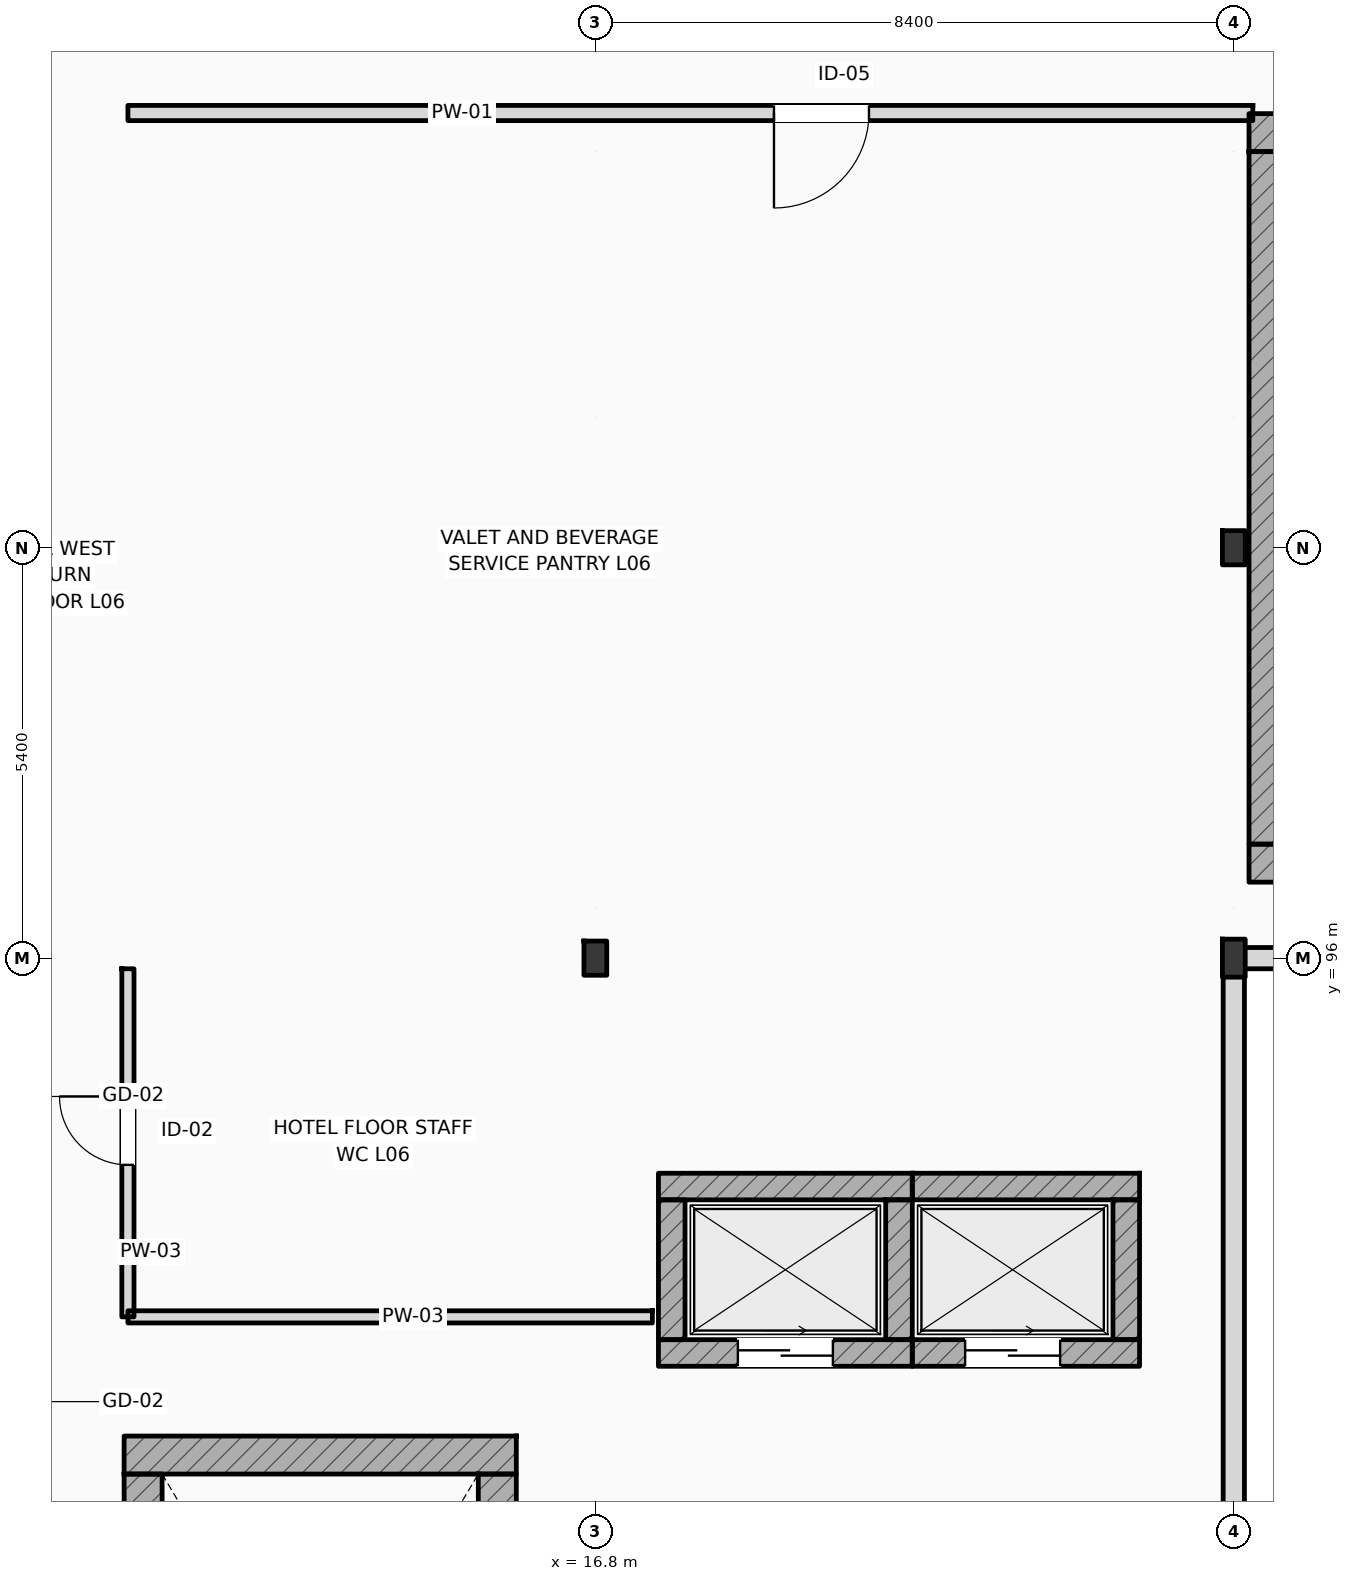
"""IFC4 building model, lengths in metres.
Left out: names, types, materials, properties, quantities, classifications, styles, units other than length and angle.
Written with IfcOpenShell. Run it as: python <this file> out.ifc"""

import sys

from ifc_helpers import new_model, si_unit, direction, frame, frame_2d, origin, origin_2d, place, context, subcontext, project, spatial, rectangle, i_section, extrude, element, fill, save


model = new_model("IFC4")
c1 = context("Model", 3, precision=1e-05, world=origin(), true_north=direction((0.0, 1.0)))
c2 = subcontext(c1, "Body", "Model", "MODEL_VIEW")
j1 = project(units=[si_unit("LENGTHUNIT", "METRE"), si_unit("PLANEANGLEUNIT", "RADIAN")], contexts=[c1])
p1 = place(None, origin())
s1 = spatial("IfcSite", under=j1, at=p1, CompositionType="ELEMENT")
p2 = place(p1, origin())
s2 = spatial("IfcBuilding", under=s1, at=p2, CompositionType="ELEMENT")
p3 = place(p2, frame((0.0, 0.0, 28.2)))
s3 = spatial("IfcBuildingStorey", under=s2, at=p3, CompositionType="ELEMENT", Elevation=28.2)
p4 = place(p3, frame((16.8, 96.0, 0.0), z_axis=(0.0, 0.0, 1.0), x_axis=(1.0, 0.0, 0.0)))
e1 = element("IfcColumn", 1, at=p4, inside=s3, PredefinedType="COLUMN", context=c2, shape_type="SweptSolid", body=[
    extrude(i_section(OverallWidth=0.3, OverallDepth=0.45, WebThickness=0.014, FlangeThickness=0.026, FilletRadius=0.027, at=origin_2d()), origin(), (0.0, 0.0, 1.0), 3.6),
])
p5 = place(p3, frame((25.2, 96.0, 0.0), z_axis=(0.0, 0.0, 1.0), x_axis=(1.0, 0.0, 0.0)))
e2 = element("IfcColumn", 2, at=p5, inside=s3, PredefinedType="COLUMN", context=c2, shape_type="SweptSolid", body=[
    extrude(i_section(OverallWidth=0.3, OverallDepth=0.5, WebThickness=0.014, FlangeThickness=0.028, FilletRadius=0.027, at=origin_2d()), origin(), (0.0, 0.0, 1.0), 3.6),
])
for number, where, z_axis, x_axis in (
    (3, (16.8, 101.4, 0.0), (0.0, 0.0, 1.0), (1.0, 0.0, 0.0)),
    (4, (25.2, 101.4, 0.0), (0.0, 0.0, 1.0), (1.0, 0.0, 0.0)),
):
    element("IfcColumn", number, at=place(p3, frame(where, z_axis=z_axis, x_axis=x_axis)), inside=s3, PredefinedType="COLUMN", context=c2, shape_type="SweptSolid", body=[
        extrude(i_section(OverallWidth=0.3, OverallDepth=0.45, WebThickness=0.014, FlangeThickness=0.026, FilletRadius=0.027, at=origin_2d()), origin(), (0.0, 0.0, 1.0), 3.6),
    ])
p6 = place(p3, frame((10.6, 89.462, 0.0), z_axis=(0.0, 0.0, 1.0), x_axis=(1.0, 0.0, 0.0)))
e5 = element("IfcWall", 5, at=p6, inside=s3, PredefinedType="SHEAR", context=c2, shape_type="SweptSolid", body=[
    extrude(rectangle(XDim=5.16, YDim=0.5, at=frame_2d((2.58, 0.0))), origin(), (0.0, 0.0, 1.0), 3.6),
])
p7 = place(p3, frame((10.85, 80.1, 0.0), z_axis=(0.0, 0.0, 1.0), x_axis=(0.0, 1.0, 0.0)))
e6 = element("IfcWall", 6, at=p7, inside=s3, PredefinedType="SHEAR", context=c2, shape_type="SweptSolid", body=[
    extrude(rectangle(XDim=9.112, YDim=0.5, at=frame_2d((4.556, 0.0))), origin(), (0.0, 0.0, 1.0), 3.6),
])
p8 = place(p3, frame((15.51, 80.1, 0.0), z_axis=(0.0, 0.0, 1.0), x_axis=(0.0, 1.0, 0.0)))
e7 = element("IfcWall", 7, at=p8, inside=s3, PredefinedType="SHEAR", context=c2, shape_type="SweptSolid", body=[
    extrude(rectangle(XDim=9.112, YDim=0.5, at=frame_2d((4.556, 0.0))), origin(), (0.0, 0.0, 1.0), 3.6),
])
p9 = place(p8, frame((0.44, 0.0, 0.0)))
e8 = element("IfcOpeningElement", 8, at=p9, cuts=e7, PredefinedType="OPENING", context=c2, shape_type="SweptSolid", body=[
    extrude(rectangle(XDim=1.1, YDim=2.2, at=frame_2d((0.55, 1.1))), frame((0.0, 0.26, 0.0), z_axis=(0.0, -1.0, 0.0), x_axis=(1.0, 0.0, 0.0)), (0.0, 0.0, 1.0), 0.52),
])
for number, where, z_axis, x_axis in (
    (9, (25.4, 106.862, 0.0), (0.0, 0.0, 1.0), (1.0, 0.0, 0.0)),
    (10, (25.4, 97.25, 0.0), (0.0, 0.0, 1.0), (1.0, 0.0, 0.0)),
):
    element("IfcWall", number, at=place(p3, frame(where, z_axis=z_axis, x_axis=x_axis)), inside=s3, PredefinedType="SHEAR", context=c2, shape_type="SweptSolid", body=[
        extrude(rectangle(XDim=5.16, YDim=0.5, at=frame_2d((2.58, 0.0))), origin(), (0.0, 0.0, 1.0), 3.6),
    ])
p10 = place(p3, frame((25.65, 97.5, 0.0), z_axis=(0.0, 0.0, 1.0), x_axis=(0.0, 1.0, 0.0)))
e11 = element("IfcWall", 11, at=p10, inside=s3, PredefinedType="SHEAR", context=c2, shape_type="SweptSolid", body=[
    extrude(rectangle(XDim=9.112, YDim=0.5, at=frame_2d((4.556, 0.0))), origin(), (0.0, 0.0, 1.0), 3.6),
])
p11 = place(p3, frame((25.2, 96.0, 0.0), z_axis=(0.0, 0.0, 1.0), x_axis=(1.0, 0.0, 0.0)))
e12 = element("IfcWall", 12, at=p11, inside=s3, PredefinedType="STANDARD", context=c2, shape_type="SweptSolid", body=[
    extrude(rectangle(XDim=94.8, YDim=0.28, at=frame_2d((47.4, 0.0))), origin(), (0.0, 0.0, 1.0), 2.8),
])
p12 = place(p11, frame((16.454, 0.0, 0.9)))
e13 = element("IfcOpeningElement", 13, at=p12, cuts=e12, PredefinedType="OPENING", context=c2, shape_type="SweptSolid", body=[
    extrude(rectangle(XDim=2.7, YDim=1.72, at=frame_2d((1.35, 0.86))), frame((0.0, 0.15, 0.0), z_axis=(0.0, -1.0, 0.0), x_axis=(1.0, 0.0, 0.0)), (0.0, 0.0, 1.0), 0.3),
])
p13 = place(p11, frame((20.068, 0.0, 0.9)))
e14 = element("IfcOpeningElement", 14, at=p13, cuts=e12, PredefinedType="OPENING", context=c2, shape_type="SweptSolid", body=[
    extrude(rectangle(XDim=2.389, YDim=1.72, at=frame_2d((1.194, 0.86))), frame((0.0, 0.15, 0.0), z_axis=(0.0, -1.0, 0.0), x_axis=(1.0, 0.0, 0.0)), (0.0, 0.0, 1.0), 0.3),
])
p14 = place(p11, frame((24.277, 0.0, 0.9)))
e15 = element("IfcOpeningElement", 15, at=p14, cuts=e12, PredefinedType="OPENING", context=c2, shape_type="SweptSolid", body=[
    extrude(rectangle(XDim=1.8, YDim=1.72, at=frame_2d((0.9, 0.86))), frame((0.0, 0.15, 0.0), z_axis=(0.0, -1.0, 0.0), x_axis=(1.0, 0.0, 0.0)), (0.0, 0.0, 1.0), 0.3),
])
p15 = place(p11, frame((27.885, 0.0, 0.9)))
e16 = element("IfcOpeningElement", 16, at=p15, cuts=e12, PredefinedType="OPENING", context=c2, shape_type="SweptSolid", body=[
    extrude(rectangle(XDim=2.388, YDim=1.72, at=frame_2d((1.194, 0.86))), frame((0.0, 0.15, 0.0), z_axis=(0.0, -1.0, 0.0), x_axis=(1.0, 0.0, 0.0)), (0.0, 0.0, 1.0), 0.3),
])
p16 = place(p11, frame((32.093, 0.0, 0.9)))
e17 = element("IfcOpeningElement", 17, at=p16, cuts=e12, PredefinedType="OPENING", context=c2, shape_type="SweptSolid", body=[
    extrude(rectangle(XDim=1.8, YDim=1.72, at=frame_2d((0.9, 0.86))), frame((0.0, 0.15, 0.0), z_axis=(0.0, -1.0, 0.0), x_axis=(1.0, 0.0, 0.0)), (0.0, 0.0, 1.0), 0.3),
])
p17 = place(p11, frame((35.702, 0.0, 0.9)))
e18 = element("IfcOpeningElement", 18, at=p17, cuts=e12, PredefinedType="OPENING", context=c2, shape_type="SweptSolid", body=[
    extrude(rectangle(XDim=2.488, YDim=1.72, at=frame_2d((1.244, 0.86))), frame((0.0, 0.15, 0.0), z_axis=(0.0, -1.0, 0.0), x_axis=(1.0, 0.0, 0.0)), (0.0, 0.0, 1.0), 0.3),
])
p18 = place(p11, frame((55.56, 0.0, 0.9)))
e19 = element("IfcOpeningElement", 19, at=p18, cuts=e12, PredefinedType="OPENING", context=c2, shape_type="SweptSolid", body=[
    extrude(rectangle(XDim=1.8, YDim=1.72, at=frame_2d((0.9, 0.86))), frame((0.0, 0.15, 0.0), z_axis=(0.0, -1.0, 0.0), x_axis=(1.0, 0.0, 0.0)), (0.0, 0.0, 1.0), 0.3),
])
p19 = place(p11, frame((58.985, 0.0, 0.9)))
e20 = element("IfcOpeningElement", 20, at=p19, cuts=e12, PredefinedType="OPENING", context=c2, shape_type="SweptSolid", body=[
    extrude(rectangle(XDim=1.8, YDim=1.72, at=frame_2d((0.9, 0.86))), frame((0.0, 0.15, 0.0), z_axis=(0.0, -1.0, 0.0), x_axis=(1.0, 0.0, 0.0)), (0.0, 0.0, 1.0), 0.3),
])
p20 = place(p11, frame((63.21, 0.0, 0.9)))
e21 = element("IfcOpeningElement", 21, at=p20, cuts=e12, PredefinedType="OPENING", context=c2, shape_type="SweptSolid", body=[
    extrude(rectangle(XDim=2.525, YDim=1.72, at=frame_2d((1.262, 0.86))), frame((0.0, 0.15, 0.0), z_axis=(0.0, -1.0, 0.0), x_axis=(1.0, 0.0, 0.0)), (0.0, 0.0, 1.0), 0.3),
])
p21 = place(p11, frame((66.955, 0.0, 0.9)))
e22 = element("IfcOpeningElement", 22, at=p21, cuts=e12, PredefinedType="OPENING", context=c2, shape_type="SweptSolid", body=[
    extrude(rectangle(XDim=1.8, YDim=1.72, at=frame_2d((0.9, 0.86))), frame((0.0, 0.15, 0.0), z_axis=(0.0, -1.0, 0.0), x_axis=(1.0, 0.0, 0.0)), (0.0, 0.0, 1.0), 0.3),
])
p22 = place(p11, frame((71.892, 0.0, 0.9)))
e23 = element("IfcOpeningElement", 23, at=p22, cuts=e12, PredefinedType="OPENING", context=c2, shape_type="SweptSolid", body=[
    extrude(rectangle(XDim=1.1, YDim=1.5, at=frame_2d((0.55, 0.75))), frame((0.0, 0.15, 0.0), z_axis=(0.0, -1.0, 0.0), x_axis=(1.0, 0.0, 0.0)), (0.0, 0.0, 1.0), 0.3),
])
p23 = place(p11, frame((75.802, 0.0, 0.9)))
e24 = element("IfcOpeningElement", 24, at=p23, cuts=e12, PredefinedType="OPENING", context=c2, shape_type="SweptSolid", body=[
    extrude(rectangle(XDim=1.25, YDim=1.6, at=frame_2d((0.625, 0.8))), frame((0.0, 0.15, 0.0), z_axis=(0.0, -1.0, 0.0), x_axis=(1.0, 0.0, 0.0)), (0.0, 0.0, 1.0), 0.3),
])
p24 = place(p11, frame((79.712, 0.0, 0.9)))
e25 = element("IfcOpeningElement", 25, at=p24, cuts=e12, PredefinedType="OPENING", context=c2, shape_type="SweptSolid", body=[
    extrude(rectangle(XDim=1.4, YDim=1.7, at=frame_2d((0.7, 0.85))), frame((0.0, 0.15, 0.0), z_axis=(0.0, -1.0, 0.0), x_axis=(1.0, 0.0, 0.0)), (0.0, 0.0, 1.0), 0.3),
])
p25 = place(p11, frame((83.597, 0.0, 0.9)))
e26 = element("IfcOpeningElement", 26, at=p25, cuts=e12, PredefinedType="OPENING", context=c2, shape_type="SweptSolid", body=[
    extrude(rectangle(XDim=1.6, YDim=1.72, at=frame_2d((0.8, 0.86))), frame((0.0, 0.15, 0.0), z_axis=(0.0, -1.0, 0.0), x_axis=(1.0, 0.0, 0.0)), (0.0, 0.0, 1.0), 0.3),
])
p26 = place(p11, frame((87.507, 0.0, 0.9)))
e27 = element("IfcOpeningElement", 27, at=p26, cuts=e12, PredefinedType="OPENING", context=c2, shape_type="SweptSolid", body=[
    extrude(rectangle(XDim=1.75, YDim=1.72, at=frame_2d((0.875, 0.86))), frame((0.0, 0.15, 0.0), z_axis=(0.0, -1.0, 0.0), x_axis=(1.0, 0.0, 0.0)), (0.0, 0.0, 1.0), 0.3),
])
p27 = place(p11, frame((91.328, 0.0, 0.9)))
e28 = element("IfcOpeningElement", 28, at=p27, cuts=e12, PredefinedType="OPENING", context=c2, shape_type="SweptSolid", body=[
    extrude(rectangle(XDim=2.0, YDim=1.72, at=frame_2d((1.0, 0.86))), frame((0.0, 0.15, 0.0), z_axis=(0.0, -1.0, 0.0), x_axis=(1.0, 0.0, 0.0)), (0.0, 0.0, 1.0), 0.3),
])
p28 = place(p3, frame((25.2, 79.5, 0.0), z_axis=(0.0, 0.0, 1.0), x_axis=(0.0, 1.0, 0.0)))
e29 = element("IfcWall", 29, at=p28, inside=s3, PredefinedType="STANDARD", context=c2, shape_type="SweptSolid", body=[
    extrude(rectangle(XDim=16.5, YDim=0.28, at=frame_2d((8.25, 0.0))), origin(), (0.0, 0.0, 1.0), 2.99),
])
p29 = place(p3, frame((17.63, 92.995, 0.0), z_axis=(0.0, 0.0, 1.0), x_axis=(1.0, 0.0, 0.0)))
e30 = element("IfcWall", 30, at=p29, inside=s3, PredefinedType="SHEAR", context=c2, shape_type="SweptSolid", body=[
    extrude(rectangle(XDim=3.34, YDim=0.35, at=frame_2d((1.67, 0.0))), origin(), (0.0, 0.0, 1.0), 3.36),
])
p30 = place(p3, frame((17.63, 90.805, 0.0), z_axis=(0.0, 0.0, 1.0), x_axis=(1.0, 0.0, 0.0)))
e31 = element("IfcWall", 31, at=p30, inside=s3, PredefinedType="SHEAR", context=c2, shape_type="SweptSolid", body=[
    extrude(rectangle(XDim=3.34, YDim=0.35, at=frame_2d((1.67, 0.0))), origin(), (0.0, 0.0, 1.0), 3.36),
])
p31 = place(p30, frame((1.045, 0.0, 0.0)))
e32 = element("IfcOpeningElement", 32, at=p31, cuts=e31, PredefinedType="OPENING", context=c2, shape_type="SweptSolid", body=[
    extrude(rectangle(XDim=1.25, YDim=2.25, at=frame_2d((0.625, 1.125))), frame((0.0, 0.185, 0.0), z_axis=(0.0, -1.0, 0.0), x_axis=(1.0, 0.0, 0.0)), (0.0, 0.0, 1.0), 0.37),
])
for number, where, z_axis, x_axis in (
    (33, (17.805, 90.98, 0.0), (0.0, 0.0, 1.0), (0.0, 1.0, 0.0)),
    (34, (20.795, 90.98, 0.0), (0.0, 0.0, 1.0), (0.0, 1.0, 0.0)),
):
    element("IfcWall", number, at=place(p3, frame(where, z_axis=z_axis, x_axis=x_axis)), inside=s3, PredefinedType="SHEAR", context=c2, shape_type="SweptSolid", body=[
        extrude(rectangle(XDim=1.84, YDim=0.35, at=frame_2d((0.92, 0.0))), origin(), (0.0, 0.0, 1.0), 3.36),
    ])
p32 = place(p3, frame((20.97, 92.995, 0.0), z_axis=(0.0, 0.0, 1.0), x_axis=(1.0, 0.0, 0.0)))
e35 = element("IfcWall", 35, at=p32, inside=s3, PredefinedType="SHEAR", context=c2, shape_type="SweptSolid", body=[
    extrude(rectangle(XDim=2.99, YDim=0.35, at=frame_2d((1.495, 0.0))), origin(), (0.0, 0.0, 1.0), 3.36),
])
p33 = place(p3, frame((20.97, 90.805, 0.0), z_axis=(0.0, 0.0, 1.0), x_axis=(1.0, 0.0, 0.0)))
e36 = element("IfcWall", 36, at=p33, inside=s3, PredefinedType="SHEAR", context=c2, shape_type="SweptSolid", body=[
    extrude(rectangle(XDim=2.99, YDim=0.35, at=frame_2d((1.495, 0.0))), origin(), (0.0, 0.0, 1.0), 3.36),
])
p34 = place(p33, frame((0.695, 0.0, 0.0)))
e37 = element("IfcOpeningElement", 37, at=p34, cuts=e36, PredefinedType="OPENING", context=c2, shape_type="SweptSolid", body=[
    extrude(rectangle(XDim=1.25, YDim=2.25, at=frame_2d((0.625, 1.125))), frame((0.0, 0.185, 0.0), z_axis=(0.0, -1.0, 0.0), x_axis=(1.0, 0.0, 0.0)), (0.0, 0.0, 1.0), 0.37),
])
p35 = place(p3, frame((23.785, 90.98, 0.0), z_axis=(0.0, 0.0, 1.0), x_axis=(0.0, 1.0, 0.0)))
e38 = element("IfcWall", 38, at=p35, inside=s3, PredefinedType="SHEAR", context=c2, shape_type="SweptSolid", body=[
    extrude(rectangle(XDim=1.84, YDim=0.35, at=frame_2d((0.92, 0.0))), origin(), (0.0, 0.0, 1.0), 3.36),
])
p36 = place(p3, frame((10.65, 107.12, 0.0), z_axis=(0.0, 0.0, 1.0), x_axis=(1.0, 0.0, 0.0)))
e39 = element("IfcWall", 39, at=p36, inside=s3, PredefinedType="PARTITIONING", context=c2, shape_type="SweptSolid", body=[
    extrude(rectangle(XDim=14.8, YDim=0.2, at=frame_2d((7.4, 0.0))), origin(), (0.0, 0.0, 1.0), 3.36),
])
p37 = place(p36, frame((8.5, 0.0, 0.0)))
e40 = element("IfcOpeningElement", 40, at=p37, cuts=e39, PredefinedType="OPENING", context=c2, shape_type="SweptSolid", body=[
    extrude(rectangle(XDim=1.25, YDim=2.15, at=frame_2d((0.625, 1.075))), frame((0.0, 0.11, 0.0), z_axis=(0.0, -1.0, 0.0), x_axis=(1.0, 0.0, 0.0)), (0.0, 0.0, 1.0), 0.22),
])
p38 = place(p3, frame((10.65, 91.28, 0.0), z_axis=(0.0, 0.0, 1.0), x_axis=(0.0, 1.0, 0.0)))
e41 = element("IfcWall", 41, at=p38, inside=s3, PredefinedType="PARTITIONING", context=c2, shape_type="SweptSolid", body=[
    extrude(rectangle(XDim=4.58, YDim=0.16, at=frame_2d((2.29, 0.0))), origin(), (0.0, 0.0, 1.0), 3.36),
])
p39 = place(p38, frame((2.0, 0.0, 0.0)))
e42 = element("IfcOpeningElement", 42, at=p39, cuts=e41, PredefinedType="OPENING", context=c2, shape_type="SweptSolid", body=[
    extrude(rectangle(XDim=0.9, YDim=2.1, at=frame_2d((0.45, 1.05))), frame((0.0, 0.09, 0.0), z_axis=(0.0, -1.0, 0.0), x_axis=(1.0, 0.0, 0.0)), (0.0, 0.0, 1.0), 0.18),
])
p40 = place(p3, frame((10.65, 91.28, 0.0), z_axis=(0.0, 0.0, 1.0), x_axis=(1.0, 0.0, 0.0)))
e43 = element("IfcWall", 43, at=p40, inside=s3, PredefinedType="PARTITIONING", context=c2, shape_type="SweptSolid", body=[
    extrude(rectangle(XDim=6.9, YDim=0.16, at=frame_2d((3.45, 0.0))), origin(), (0.0, 0.0, 1.0), 3.36),
])
p41 = place(p31, origin())
e44 = element("IfcDoor", 44, at=p41, inside=s3, OperationType="SLIDING_TO_LEFT", PredefinedType="DOOR", context=c2, shape_type="SweptSolid", body=[
    extrude(rectangle(XDim=1.25, YDim=2.25, at=frame_2d((0.625, 1.125))), frame((0.0, 0.025, 0.0), z_axis=(0.0, -1.0, 0.0), x_axis=(1.0, 0.0, 0.0)), (0.0, 0.0, 1.0), 0.05),
])
fill(e32, e44)
p42 = place(p34, origin())
e45 = element("IfcDoor", 45, at=p42, inside=s3, OperationType="SLIDING_TO_LEFT", PredefinedType="DOOR", context=c2, shape_type="SweptSolid", body=[
    extrude(rectangle(XDim=1.25, YDim=2.25, at=frame_2d((0.625, 1.125))), frame((0.0, 0.025, 0.0), z_axis=(0.0, -1.0, 0.0), x_axis=(1.0, 0.0, 0.0)), (0.0, 0.0, 1.0), 0.05),
])
fill(e37, e45)
p43 = place(p39, origin())
e46 = element("IfcDoor", 46, at=p43, inside=s3, OperationType="SINGLE_SWING_RIGHT", PredefinedType="DOOR", context=c2, shape_type="SweptSolid", body=[
    extrude(rectangle(XDim=0.9, YDim=2.1, at=frame_2d((0.45, 1.05))), frame((0.0, 0.025, 0.0), z_axis=(0.0, -1.0, 0.0), x_axis=(1.0, 0.0, 0.0)), (0.0, 0.0, 1.0), 0.05),
])
fill(e42, e46)
p44 = place(p37, frame((1.25, 0.0, 0.0), z_axis=(0.0, 0.0, 1.0), x_axis=(-1.0, 0.0, 0.0)))
e47 = element("IfcDoor", 47, at=p44, inside=s3, OperationType="SINGLE_SWING_LEFT", PredefinedType="DOOR", context=c2, shape_type="SweptSolid", body=[
    extrude(rectangle(XDim=1.25, YDim=2.15, at=frame_2d((0.625, 1.075))), frame((0.0, 0.025, 0.0), z_axis=(0.0, -1.0, 0.0), x_axis=(1.0, 0.0, 0.0)), (0.0, 0.0, 1.0), 0.05),
])
fill(e40, e47)
save(model, sys.argv[1])
